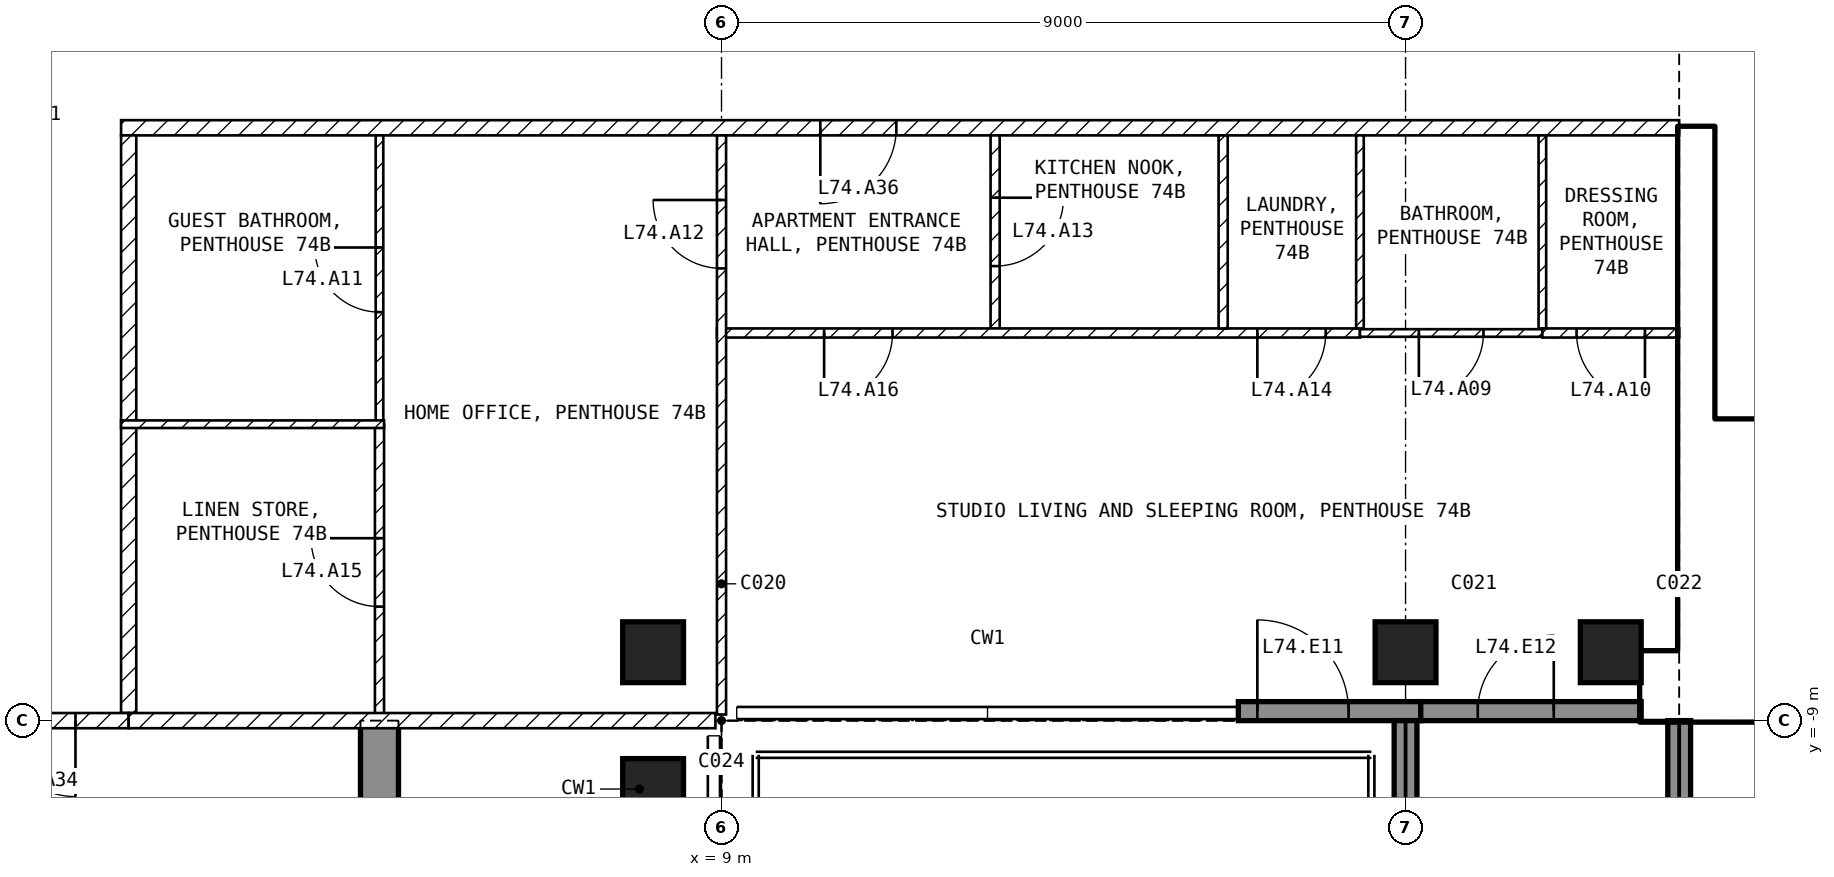
"""IFC4 building model, lengths in metres.
Left out: names, types, materials, properties, quantities, classifications, styles, units other than length and angle.
Written with IfcOpenShell. Run it as: python <this file> out.ifc"""

import sys

from ifc_helpers import new_model, si_unit, direction, frame, frame_2d, origin, origin_2d, place, context, subcontext, project, spatial, polyline, rectangle, outline, extrude, element, fill, save


model = new_model("IFC4")
c1 = context("Model", 3, precision=1e-05, world=origin(), true_north=direction((0.0, 1.0)))
c2 = subcontext(c1, "Body", "Model", "MODEL_VIEW")
j1 = project(units=[si_unit("LENGTHUNIT", "METRE"), si_unit("PLANEANGLEUNIT", "RADIAN")], contexts=[c1])
p1 = place(None, origin())
s1 = spatial("IfcSite", under=j1, at=p1, CompositionType="ELEMENT")
p2 = place(p1, origin())
s2 = spatial("IfcBuilding", under=s1, at=p2, CompositionType="ELEMENT")
p3 = place(p2, frame((0.0, 0.0, 290.4)))
s3 = spatial("IfcBuildingStorey", under=s2, at=p3, CompositionType="ELEMENT", Elevation=290.4)
for number, where, z_axis, x_axis in (
    (1, (8.1, -9.9, -0.25), (0.0, 0.0, 1.0), (1.0, 0.0, 0.0)),
    (2, (8.1, -8.1, -0.25), (0.0, 0.0, 1.0), (1.0, 0.0, 0.0)),
    (3, (18.0, -8.1, -0.25), (0.0, 0.0, 1.0), (1.0, 0.0, 0.0)),
    (4, (20.7, -8.1, -0.25), (0.0, 0.0, 1.0), (1.0, 0.0, 0.0)),
):
    element("IfcColumn", number, at=place(p3, frame(where, z_axis=z_axis, x_axis=x_axis)), inside=s3, PredefinedType="COLUMN", context=c2, shape_type="SweptSolid", body=[
        extrude(rectangle(XDim=0.8, YDim=0.8, at=origin_2d()), origin(), (0.0, 0.0, 1.0), 4.2),
    ])
p4 = place(p3, frame((4.25, -13.1, -0.25), z_axis=(1.0, 0.0, 0.0), x_axis=(0.0, 1.0, 0.0)))
e5 = element("IfcWall", 5, at=p4, inside=s3, PredefinedType="SHEAR", context=c2, shape_type="SweptSolid", body=[
    extrude(outline(polyline([(0.0, 0.0), (4.1, 0.0), (4.1, 4.2), (0.0, 4.2), (0.0, 0.0)])), origin(), (0.0, 0.0, 1.0), 0.5),
])
p5 = place(p3, frame((15.8, -8.875, 0.0), z_axis=(0.0, 0.0, 1.0), x_axis=(1.0, 0.0, 0.0)))
e6 = element("IfcWall", 6, at=p5, inside=s3, PredefinedType="SOLIDWALL", context=c2, shape_type="SweptSolid", body=[
    extrude(rectangle(XDim=2.4, YDim=0.25, at=frame_2d((1.2, 0.0))), origin(), (0.0, 0.0, 1.0), 3.95),
])
p6 = place(p5, frame((0.25, 0.0, 0.0)))
e7 = element("IfcOpeningElement", 7, at=p6, cuts=e6, PredefinedType="OPENING", context=c2, shape_type="SweptSolid", body=[
    extrude(rectangle(XDim=1.2, YDim=2.4, at=frame_2d((0.6, 1.2))), frame((0.0, 0.135, 0.0), z_axis=(0.0, -1.0, 0.0), x_axis=(1.0, 0.0, 0.0)), (0.0, 0.0, 1.0), 0.27),
])
p7 = place(p3, frame((18.2, -8.875, 0.0), z_axis=(0.0, 0.0, 1.0), x_axis=(1.0, 0.0, 0.0)))
e8 = element("IfcWall", 8, at=p7, inside=s3, PredefinedType="SOLIDWALL", context=c2, shape_type="SweptSolid", body=[
    extrude(rectangle(XDim=2.9, YDim=0.25, at=frame_2d((1.45, 0.0))), origin(), (0.0, 0.0, 1.0), 3.95),
])
p8 = place(p7, frame((0.75, 0.0, 0.0)))
e9 = element("IfcOpeningElement", 9, at=p8, cuts=e8, PredefinedType="OPENING", context=c2, shape_type="SweptSolid", body=[
    extrude(rectangle(XDim=1.0, YDim=2.4, at=frame_2d((0.5, 1.2))), frame((0.0, 0.135, 0.0), z_axis=(0.0, -1.0, 0.0), x_axis=(1.0, 0.0, 0.0)), (0.0, 0.0, 1.0), 0.27),
])
p9 = place(p3, frame((18.0, -9.0, 0.0), z_axis=(0.0, 0.0, 1.0), x_axis=(0.0, -1.0, 0.0)))
e10 = element("IfcWall", 10, at=p9, inside=s3, PredefinedType="SOLIDWALL", context=c2, shape_type="SweptSolid", body=[
    extrude(rectangle(XDim=2.74, YDim=0.3, at=frame_2d((1.37, 0.0))), origin(), (0.0, 0.0, 1.0), 3.95),
])
p10 = place(p3, frame((21.6, -9.0, 0.0), z_axis=(0.0, 0.0, 1.0), x_axis=(0.0, -1.0, 0.0)))
e11 = element("IfcWall", 11, at=p10, inside=s3, PredefinedType="SOLIDWALL", context=c2, shape_type="SweptSolid", body=[
    extrude(rectangle(XDim=2.7, YDim=0.3, at=frame_2d((1.35, 0.0))), origin(), (0.0, 0.0, 1.0), 3.95),
])
p11 = place(p3, frame((21.1, -8.55, 0.0), z_axis=(0.0, 0.0, 1.0), x_axis=(1.0, 0.0, 0.0)))
e12 = element("IfcWall", 12, at=p11, inside=s3, PredefinedType="SHEAR", context=c2, shape_type="SweptSolid", body=[
    extrude(rectangle(XDim=9.1, YDim=0.9, at=frame_2d((4.55, 0.0))), origin(), (0.0, 0.0, 1.0), 3.95),
])
p12 = place(p3, frame((21.825, -8.1, 0.0), z_axis=(0.0, 0.0, 1.0), x_axis=(0.0, 1.0, 0.0)))
e13 = element("IfcWall", 13, at=p12, inside=s3, PredefinedType="SHEAR", context=c2, shape_type="SweptSolid", body=[
    extrude(rectangle(XDim=6.9, YDim=0.45, at=frame_2d((3.45, 0.0))), origin(), (0.0, 0.0, 1.0), 3.95),
])
p13 = place(p3, frame((22.05, -5.15, 0.0), z_axis=(0.0, 0.0, 1.0), x_axis=(1.0, 0.0, 0.0)))
e14 = element("IfcWall", 14, at=p13, inside=s3, PredefinedType="SOLIDWALL", context=c2, shape_type="SweptSolid", body=[
    extrude(rectangle(XDim=6.3, YDim=0.2, at=frame_2d((3.15, 0.0))), origin(), (0.0, 0.0, 1.0), 3.95),
])
p14 = place(p13, frame((0.2, 0.0, 0.0)))
e15 = element("IfcOpeningElement", 15, at=p14, cuts=e14, PredefinedType="OPENING", context=c2, shape_type="SweptSolid", body=[
    extrude(rectangle(XDim=1.0, YDim=2.1, at=frame_2d((0.5, 1.05))), frame((0.0, 0.11, 0.0), z_axis=(0.0, -1.0, 0.0), x_axis=(1.0, 0.0, 0.0)), (0.0, 0.0, 1.0), 0.22),
])
p15 = place(p3, frame((21.6, -1.2, 0.0), z_axis=(0.0, 0.0, 1.0), x_axis=(-1.0, 0.0, 0.0)))
e16 = element("IfcWall", 16, at=p15, inside=s3, PredefinedType="PARTITIONING", context=c2, shape_type="SweptSolid", body=[
    extrude(rectangle(XDim=20.5, YDim=0.2, at=frame_2d((10.25, 0.0))), origin(), (0.0, 0.0, 1.0), 3.95),
])
p16 = place(p15, frame((10.3, 0.0, 0.0)))
e17 = element("IfcOpeningElement", 17, at=p16, cuts=e16, PredefinedType="OPENING", context=c2, shape_type="SweptSolid", body=[
    extrude(rectangle(XDim=1.0, YDim=2.1, at=frame_2d((0.5, 1.05))), frame((0.0, 0.11, 0.0), z_axis=(0.0, -1.0, 0.0), x_axis=(1.0, 0.0, 0.0)), (0.0, 0.0, 1.0), 0.22),
])
p17 = place(p3, frame((1.2, -1.3, 0.0), z_axis=(0.0, 0.0, 1.0), x_axis=(0.0, -1.0, 0.0)))
e18 = element("IfcWall", 18, at=p17, inside=s3, PredefinedType="PARTITIONING", context=c2, shape_type="SweptSolid", body=[
    extrude(rectangle(XDim=7.6, YDim=0.2, at=frame_2d((3.8, 0.0))), origin(), (0.0, 0.0, 1.0), 3.95),
])
p18 = place(p3, frame((1.2, -9.0, 0.0), z_axis=(0.0, 0.0, 1.0), x_axis=(-1.0, 0.0, 0.0)))
e19 = element("IfcWall", 19, at=p18, inside=s3, PredefinedType="PARTITIONING", context=c2, shape_type="SweptSolid", body=[
    extrude(rectangle(XDim=2.4, YDim=0.2, at=frame_2d((1.2, 0.0))), origin(), (0.0, 0.0, 1.0), 3.95),
])
p19 = place(p18, frame((0.7, 0.0, 0.0)))
e20 = element("IfcOpeningElement", 20, at=p19, cuts=e19, PredefinedType="OPENING", context=c2, shape_type="SweptSolid", body=[
    extrude(rectangle(XDim=1.0, YDim=2.1, at=frame_2d((0.5, 1.05))), frame((0.0, 0.11, 0.0), z_axis=(0.0, -1.0, 0.0), x_axis=(1.0, 0.0, 0.0)), (0.0, 0.0, 1.0), 0.22),
])
p20 = place(p3, frame((12.6, -1.3, 0.0), z_axis=(0.0, 0.0, 1.0), x_axis=(0.0, -1.0, 0.0)))
e21 = element("IfcWall", 21, at=p20, inside=s3, PredefinedType="PARTITIONING", context=c2, shape_type="SweptSolid", body=[
    extrude(rectangle(XDim=2.54, YDim=0.12, at=frame_2d((1.27, 0.0))), origin(), (0.0, 0.0, 1.0), 3.95),
])
p21 = place(p20, frame((0.82, 0.0, 0.0)))
e22 = element("IfcOpeningElement", 22, at=p21, cuts=e21, PredefinedType="OPENING", context=c2, shape_type="SweptSolid", body=[
    extrude(rectangle(XDim=0.9, YDim=2.1, at=frame_2d((0.45, 1.05))), frame((0.0, 0.07, 0.0), z_axis=(0.0, -1.0, 0.0), x_axis=(1.0, 0.0, 0.0)), (0.0, 0.0, 1.0), 0.14),
])
p22 = place(p3, frame((17.4, -3.9, 0.0), z_axis=(0.0, 0.0, 1.0), x_axis=(-1.0, 0.0, 0.0)))
e23 = element("IfcWall", 23, at=p22, inside=s3, PredefinedType="PARTITIONING", context=c2, shape_type="SweptSolid", body=[
    extrude(rectangle(XDim=8.46, YDim=0.12, at=frame_2d((4.23, 0.0))), origin(), (0.0, 0.0, 1.0), 3.95),
])
p23 = place(p22, frame((0.45, 0.0, 0.0)))
e24 = element("IfcOpeningElement", 24, at=p23, cuts=e23, PredefinedType="OPENING", context=c2, shape_type="SweptSolid", body=[
    extrude(rectangle(XDim=0.9, YDim=2.1, at=frame_2d((0.45, 1.05))), frame((0.0, 0.07, 0.0), z_axis=(0.0, -1.0, 0.0), x_axis=(1.0, 0.0, 0.0)), (0.0, 0.0, 1.0), 0.14),
])
p24 = place(p22, frame((6.15, 0.0, 0.0)))
e25 = element("IfcOpeningElement", 25, at=p24, cuts=e23, PredefinedType="OPENING", context=c2, shape_type="SweptSolid", body=[
    extrude(rectangle(XDim=0.9, YDim=2.1, at=frame_2d((0.45, 1.05))), frame((0.0, 0.07, 0.0), z_axis=(0.0, -1.0, 0.0), x_axis=(1.0, 0.0, 0.0)), (0.0, 0.0, 1.0), 0.14),
])
p25 = place(p3, frame((9.0, -8.92, 0.0), z_axis=(0.0, 0.0, 1.0), x_axis=(0.0, 1.0, 0.0)))
e26 = element("IfcWall", 26, at=p25, inside=s3, PredefinedType="PARTITIONING", context=c2, shape_type="SweptSolid", body=[
    extrude(rectangle(XDim=7.62, YDim=0.12, at=frame_2d((3.81, 0.0))), origin(), (0.0, 0.0, 1.0), 3.95),
])
p26 = place(p25, frame((5.87, 0.0, 0.0)))
e27 = element("IfcOpeningElement", 27, at=p26, cuts=e26, PredefinedType="OPENING", context=c2, shape_type="SweptSolid", body=[
    extrude(rectangle(XDim=0.9, YDim=2.1, at=frame_2d((0.45, 1.05))), frame((0.0, 0.07, 0.0), z_axis=(0.0, -1.0, 0.0), x_axis=(1.0, 0.0, 0.0)), (0.0, 0.0, 1.0), 0.14),
])
p27 = place(p3, frame((15.6, -1.3, 0.0), z_axis=(0.0, 0.0, 1.0), x_axis=(0.0, -1.0, 0.0)))
e28 = element("IfcWall", 28, at=p27, inside=s3, PredefinedType="PARTITIONING", context=c2, shape_type="SweptSolid", body=[
    extrude(rectangle(XDim=2.54, YDim=0.12, at=frame_2d((1.27, 0.0))), origin(), (0.0, 0.0, 1.0), 3.95),
])
for number, where, z_axis, x_axis in (
    (29, (17.4, -1.3, 0.0), (0.0, 0.0, 1.0), (0.0, -1.0, 0.0)),
    (30, (19.8, -1.3, 0.0), (0.0, 0.0, 1.0), (0.0, -1.0, 0.0)),
):
    element("IfcWall", number, at=place(p3, frame(where, z_axis=z_axis, x_axis=x_axis)), inside=s3, PredefinedType="PARTITIONING", context=c2, shape_type="SweptSolid", body=[
        extrude(rectangle(XDim=2.54, YDim=0.1, at=frame_2d((1.27, 0.0))), origin(), (0.0, 0.0, 1.0), 3.95),
    ])
p28 = place(p3, frame((19.8, -3.9, 0.0), z_axis=(0.0, 0.0, 1.0), x_axis=(-1.0, 0.0, 0.0)))
e31 = element("IfcWall", 31, at=p28, inside=s3, PredefinedType="PARTITIONING", context=c2, shape_type="SweptSolid", body=[
    extrude(rectangle(XDim=2.4, YDim=0.1, at=frame_2d((1.2, 0.0))), origin(), (0.0, 0.0, 1.0), 3.95),
])
p29 = place(p28, frame((0.775, 0.0, 0.0)))
e32 = element("IfcOpeningElement", 32, at=p29, cuts=e31, PredefinedType="OPENING", context=c2, shape_type="SweptSolid", body=[
    extrude(rectangle(XDim=0.85, YDim=2.1, at=frame_2d((0.425, 1.05))), frame((0.0, 0.06, 0.0), z_axis=(0.0, -1.0, 0.0), x_axis=(1.0, 0.0, 0.0)), (0.0, 0.0, 1.0), 0.12),
])
p30 = place(p3, frame((21.6, -3.9, 0.0), z_axis=(0.0, 0.0, 1.0), x_axis=(-1.0, 0.0, 0.0)))
e33 = element("IfcWall", 33, at=p30, inside=s3, PredefinedType="PARTITIONING", context=c2, shape_type="SweptSolid", body=[
    extrude(rectangle(XDim=1.8, YDim=0.12, at=frame_2d((0.9, 0.0))), origin(), (0.0, 0.0, 1.0), 3.95),
])
p31 = place(p30, frame((0.45, 0.0, 0.0)))
e34 = element("IfcOpeningElement", 34, at=p31, cuts=e33, PredefinedType="OPENING", context=c2, shape_type="SweptSolid", body=[
    extrude(rectangle(XDim=0.9, YDim=2.1, at=frame_2d((0.45, 1.05))), frame((0.0, 0.07, 0.0), z_axis=(0.0, -1.0, 0.0), x_axis=(1.0, 0.0, 0.0)), (0.0, 0.0, 1.0), 0.14),
])
p32 = place(p3, frame((4.5, -5.1, 0.0), z_axis=(0.0, 0.0, 1.0), x_axis=(0.0, 1.0, 0.0)))
e35 = element("IfcWall", 35, at=p32, inside=s3, PredefinedType="PARTITIONING", context=c2, shape_type="SweptSolid", body=[
    extrude(rectangle(XDim=3.8, YDim=0.1, at=frame_2d((1.9, 0.0))), origin(), (0.0, 0.0, 1.0), 3.95),
])
p33 = place(p32, frame((1.475, 0.0, 0.0)))
e36 = element("IfcOpeningElement", 36, at=p33, cuts=e35, PredefinedType="OPENING", context=c2, shape_type="SweptSolid", body=[
    extrude(rectangle(XDim=0.85, YDim=2.1, at=frame_2d((0.425, 1.05))), frame((0.0, 0.06, 0.0), z_axis=(0.0, -1.0, 0.0), x_axis=(1.0, 0.0, 0.0)), (0.0, 0.0, 1.0), 0.12),
])
p34 = place(p3, frame((4.5, -9.0, 0.0), z_axis=(0.0, 0.0, 1.0), x_axis=(0.0, 1.0, 0.0)))
e37 = element("IfcWall", 37, at=p34, inside=s3, PredefinedType="PARTITIONING", context=c2, shape_type="SweptSolid", body=[
    extrude(rectangle(XDim=3.9, YDim=0.12, at=frame_2d((1.95, 0.0))), origin(), (0.0, 0.0, 1.0), 3.95),
])
p35 = place(p34, frame((1.5, 0.0, 0.0)))
e38 = element("IfcOpeningElement", 38, at=p35, cuts=e37, PredefinedType="OPENING", context=c2, shape_type="SweptSolid", body=[
    extrude(rectangle(XDim=0.9, YDim=2.1, at=frame_2d((0.45, 1.05))), frame((0.0, 0.07, 0.0), z_axis=(0.0, -1.0, 0.0), x_axis=(1.0, 0.0, 0.0)), (0.0, 0.0, 1.0), 0.14),
])
p36 = place(p3, frame((8.92, -9.0, 0.0), z_axis=(0.0, 0.0, 1.0), x_axis=(-1.0, 0.0, 0.0)))
e39 = element("IfcWall", 39, at=p36, inside=s3, PredefinedType="PARTITIONING", context=c2, shape_type="SweptSolid", body=[
    extrude(rectangle(XDim=7.72, YDim=0.2, at=frame_2d((3.86, 0.0))), origin(), (0.0, 0.0, 1.0), 3.95),
])
p37 = place(p3, frame((4.56, -5.1, 0.0), z_axis=(0.0, 0.0, 1.0), x_axis=(-1.0, 0.0, 0.0)))
e40 = element("IfcWall", 40, at=p37, inside=s3, PredefinedType="PARTITIONING", context=c2, shape_type="SweptSolid", body=[
    extrude(rectangle(XDim=3.46, YDim=0.1, at=frame_2d((1.73, 0.0))), origin(), (0.0, 0.0, 1.0), 3.95),
])
p38 = place(p6, origin())
e41 = element("IfcDoor", 41, at=p38, inside=s3, OperationType="SINGLE_SWING_LEFT", PredefinedType="DOOR", context=c2, shape_type="SweptSolid", body=[
    extrude(rectangle(XDim=1.2, YDim=2.4, at=frame_2d((0.6, 1.2))), frame((0.0, 0.025, 0.0), z_axis=(0.0, -1.0, 0.0), x_axis=(1.0, 0.0, 0.0)), (0.0, 0.0, 1.0), 0.05),
])
fill(e7, e41)
p39 = place(p8, origin())
e42 = element("IfcDoor", 42, at=p39, inside=s3, OperationType="SINGLE_SWING_RIGHT", PredefinedType="DOOR", context=c2, shape_type="SweptSolid", body=[
    extrude(rectangle(XDim=1.0, YDim=2.4, at=frame_2d((0.5, 1.2))), frame((0.0, 0.025, 0.0), z_axis=(0.0, -1.0, 0.0), x_axis=(1.0, 0.0, 0.0)), (0.0, 0.0, 1.0), 0.05),
])
fill(e9, e42)
p40 = place(p14, origin())
e43 = element("IfcDoor", 43, at=p40, inside=s3, OperationType="SINGLE_SWING_LEFT", PredefinedType="DOOR", context=c2, shape_type="SweptSolid", body=[
    extrude(rectangle(XDim=1.0, YDim=2.1, at=frame_2d((0.5, 1.05))), frame((0.0, 0.025, 0.0), z_axis=(0.0, -1.0, 0.0), x_axis=(1.0, 0.0, 0.0)), (0.0, 0.0, 1.0), 0.05),
])
fill(e15, e43)
p41 = place(p29, origin())
e44 = element("IfcDoor", 44, at=p41, inside=s3, OperationType="SINGLE_SWING_RIGHT", PredefinedType="DOOR", context=c2, shape_type="SweptSolid", body=[
    extrude(rectangle(XDim=0.85, YDim=2.1, at=frame_2d((0.425, 1.05))), frame((0.0, 0.025, 0.0), z_axis=(0.0, -1.0, 0.0), x_axis=(1.0, 0.0, 0.0)), (0.0, 0.0, 1.0), 0.05),
])
fill(e32, e44)
p42 = place(p31, origin())
e45 = element("IfcDoor", 45, at=p42, inside=s3, OperationType="SINGLE_SWING_LEFT", PredefinedType="DOOR", context=c2, shape_type="SweptSolid", body=[
    extrude(rectangle(XDim=0.9, YDim=2.1, at=frame_2d((0.45, 1.05))), frame((0.0, 0.025, 0.0), z_axis=(0.0, -1.0, 0.0), x_axis=(1.0, 0.0, 0.0)), (0.0, 0.0, 1.0), 0.05),
])
fill(e34, e45)
p43 = place(p33, origin())
e46 = element("IfcDoor", 46, at=p43, inside=s3, OperationType="SINGLE_SWING_RIGHT", PredefinedType="DOOR", context=c2, shape_type="SweptSolid", body=[
    extrude(rectangle(XDim=0.85, YDim=2.1, at=frame_2d((0.425, 1.05))), frame((0.0, 0.025, 0.0), z_axis=(0.0, -1.0, 0.0), x_axis=(1.0, 0.0, 0.0)), (0.0, 0.0, 1.0), 0.05),
])
fill(e36, e46)
p44 = place(p26, origin())
e47 = element("IfcDoor", 47, at=p44, inside=s3, OperationType="SINGLE_SWING_RIGHT", PredefinedType="DOOR", context=c2, shape_type="SweptSolid", body=[
    extrude(rectangle(XDim=0.9, YDim=2.1, at=frame_2d((0.45, 1.05))), frame((0.0, 0.025, 0.0), z_axis=(0.0, -1.0, 0.0), x_axis=(1.0, 0.0, 0.0)), (0.0, 0.0, 1.0), 0.05),
])
fill(e27, e47)
p45 = place(p21, origin())
e48 = element("IfcDoor", 48, at=p45, inside=s3, OperationType="SINGLE_SWING_LEFT", PredefinedType="DOOR", context=c2, shape_type="SweptSolid", body=[
    extrude(rectangle(XDim=0.9, YDim=2.1, at=frame_2d((0.45, 1.05))), frame((0.0, 0.025, 0.0), z_axis=(0.0, -1.0, 0.0), x_axis=(1.0, 0.0, 0.0)), (0.0, 0.0, 1.0), 0.05),
])
fill(e22, e48)
p46 = place(p23, origin())
e49 = element("IfcDoor", 49, at=p46, inside=s3, OperationType="SINGLE_SWING_RIGHT", PredefinedType="DOOR", context=c2, shape_type="SweptSolid", body=[
    extrude(rectangle(XDim=0.9, YDim=2.1, at=frame_2d((0.45, 1.05))), frame((0.0, 0.025, 0.0), z_axis=(0.0, -1.0, 0.0), x_axis=(1.0, 0.0, 0.0)), (0.0, 0.0, 1.0), 0.05),
])
fill(e24, e49)
p47 = place(p35, origin())
e50 = element("IfcDoor", 50, at=p47, inside=s3, OperationType="SINGLE_SWING_RIGHT", PredefinedType="DOOR", context=c2, shape_type="SweptSolid", body=[
    extrude(rectangle(XDim=0.9, YDim=2.1, at=frame_2d((0.45, 1.05))), frame((0.0, 0.025, 0.0), z_axis=(0.0, -1.0, 0.0), x_axis=(1.0, 0.0, 0.0)), (0.0, 0.0, 1.0), 0.05),
])
fill(e38, e50)
p48 = place(p24, origin())
e51 = element("IfcDoor", 51, at=p48, inside=s3, OperationType="SINGLE_SWING_RIGHT", PredefinedType="DOOR", context=c2, shape_type="SweptSolid", body=[
    extrude(rectangle(XDim=0.9, YDim=2.1, at=frame_2d((0.45, 1.05))), frame((0.0, 0.025, 0.0), z_axis=(0.0, -1.0, 0.0), x_axis=(1.0, 0.0, 0.0)), (0.0, 0.0, 1.0), 0.05),
])
fill(e25, e51)
p49 = place(p19, origin())
e52 = element("IfcDoor", 52, at=p49, inside=s3, OperationType="SINGLE_SWING_LEFT", PredefinedType="DOOR", context=c2, shape_type="SweptSolid", body=[
    extrude(rectangle(XDim=1.0, YDim=2.1, at=frame_2d((0.5, 1.05))), frame((0.0, 0.025, 0.0), z_axis=(0.0, -1.0, 0.0), x_axis=(1.0, 0.0, 0.0)), (0.0, 0.0, 1.0), 0.05),
])
fill(e20, e52)
p50 = place(p16, origin())
e53 = element("IfcDoor", 53, at=p50, inside=s3, OperationType="SINGLE_SWING_RIGHT", PredefinedType="DOOR", context=c2, shape_type="SweptSolid", body=[
    extrude(rectangle(XDim=1.0, YDim=2.1, at=frame_2d((0.5, 1.05))), frame((0.0, 0.025, 0.0), z_axis=(0.0, -1.0, 0.0), x_axis=(1.0, 0.0, 0.0)), (0.0, 0.0, 1.0), 0.05),
])
fill(e17, e53)
save(model, sys.argv[1])
